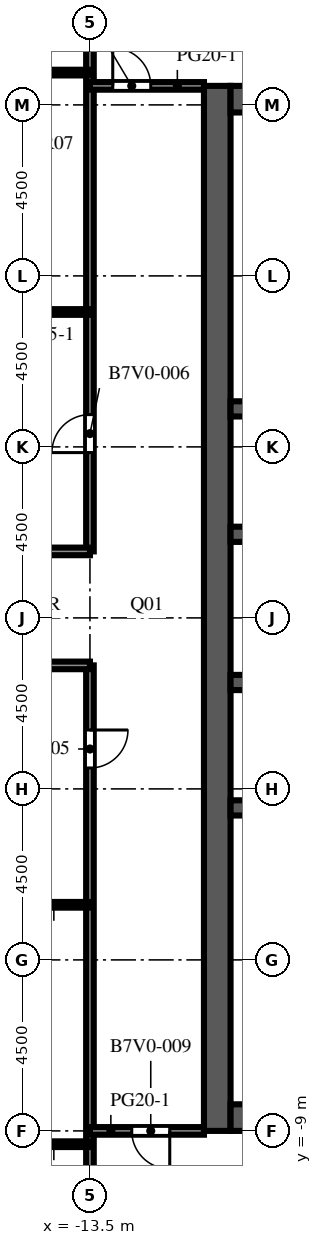
"""IFC4 building model, lengths in metres.
Left out: names, types, materials, properties, quantities, classifications, styles, units other than length and angle.
Written with IfcOpenShell. Run it as: python <this file> out.ifc"""

import sys

from ifc_helpers import new_model, si_unit, direction, frame, frame_2d, origin, place, context, subcontext, project, spatial, rectangle, extrude, element, fill, save


model = new_model("IFC4")
c1 = context("Model", 3, precision=1e-05, world=origin(), true_north=direction((0.0, 1.0)))
c2 = subcontext(c1, "Body", "Model", "MODEL_VIEW")
j1 = project(units=[si_unit("LENGTHUNIT", "METRE"), si_unit("PLANEANGLEUNIT", "RADIAN")], contexts=[c1])
p1 = place(None, origin())
s1 = spatial("IfcSite", under=j1, at=p1, CompositionType="ELEMENT")
p2 = place(p1, origin())
s2 = spatial("IfcBuilding", under=s1, at=p2, CompositionType="ELEMENT")
p3 = place(p2, frame((0.0, 0.0, 239.8)))
s3 = spatial("IfcBuildingStorey", under=s2, at=p3, CompositionType="ELEMENT", Elevation=239.8)
p4 = place(p3, frame((-10.15, -9.0, 0.0), z_axis=(0.0, 0.0, 1.0), x_axis=(0.0, 1.0, 0.0)))
e1 = element("IfcWall", 1, at=p4, inside=s3, PredefinedType="SHEAR", context=c2, shape_type="SweptSolid", body=[
    extrude(rectangle(XDim=27.5, YDim=0.7, at=frame_2d((13.75, 0.0))), origin(), (0.0, 0.0, 1.0), 4.1),
])
p5 = place(p4, frame((12.55, 0.0, 0.0)))
e2 = element("IfcOpeningElement", 2, at=p5, cuts=e1, PredefinedType="OPENING", context=c2, shape_type="SweptSolid", body=[
    extrude(rectangle(XDim=2.4, YDim=2.4, at=frame_2d((1.2, 1.2))), frame((0.0, 0.36, 0.0), z_axis=(0.0, -1.0, 0.0), x_axis=(1.0, 0.0, 0.0)), (0.0, 0.0, 1.0), 0.72),
])
p6 = place(p4, frame((6.825, 0.0, 0.0)))
e3 = element("IfcOpeningElement", 3, at=p6, cuts=e1, PredefinedType="OPENING", context=c2, shape_type="SweptSolid", body=[
    extrude(rectangle(XDim=1.2, YDim=2.1, at=frame_2d((0.6, 1.05))), frame((0.0, 0.36, 0.0), z_axis=(0.0, -1.0, 0.0), x_axis=(1.0, 0.0, 0.0)), (0.0, 0.0, 1.0), 0.72),
])
p7 = place(p4, frame((19.475, 0.0, 0.0)))
e4 = element("IfcOpeningElement", 4, at=p7, cuts=e1, PredefinedType="OPENING", context=c2, shape_type="SweptSolid", body=[
    extrude(rectangle(XDim=1.2, YDim=2.1, at=frame_2d((0.6, 1.05))), frame((0.0, 0.36, 0.0), z_axis=(0.0, -1.0, 0.0), x_axis=(1.0, 0.0, 0.0)), (0.0, 0.0, 1.0), 0.72),
])
for number, where, z_axis, x_axis in (
    (5, (-9.8, -8.65, 0.0), (0.0, 0.0, 1.0), (1.0, 0.0, 0.0)),
    (6, (-9.8, 18.15, 0.0), (0.0, 0.0, 1.0), (1.0, 0.0, 0.0)),
):
    element("IfcWall", number, at=place(p3, frame(where, z_axis=z_axis, x_axis=x_axis)), inside=s3, PredefinedType="SHEAR", context=c2, shape_type="SweptSolid", body=[
        extrude(rectangle(XDim=10.6, YDim=0.7, at=frame_2d((5.3, 0.0))), origin(), (0.0, 0.0, 1.0), 4.1),
    ])
p8 = place(p3, frame((-9.8, -0.5, 0.0), z_axis=(0.0, 0.0, 1.0), x_axis=(1.0, 0.0, 0.0)))
e7 = element("IfcWall", 7, at=p8, inside=s3, PredefinedType="SHEAR", context=c2, shape_type="SweptSolid", body=[
    extrude(rectangle(XDim=10.6, YDim=0.4, at=frame_2d((5.3, 0.0))), origin(), (0.0, 0.0, 1.0), 4.1),
])
p9 = place(p3, frame((-9.8, 2.8, 0.0), z_axis=(0.0, 0.0, 1.0), x_axis=(1.0, 0.0, 0.0)))
e8 = element("IfcWall", 8, at=p9, inside=s3, PredefinedType="SHEAR", context=c2, shape_type="SweptSolid", body=[
    extrude(rectangle(XDim=10.6, YDim=0.4, at=frame_2d((5.3, 0.0))), origin(), (0.0, 0.0, 1.0), 4.1),
])
p10 = place(p9, frame((0.688, 0.0, 0.0)))
e9 = element("IfcOpeningElement", 9, at=p10, cuts=e8, PredefinedType="OPENING", context=c2, shape_type="SweptSolid", body=[
    extrude(rectangle(XDim=1.1, YDim=2.1, at=frame_2d((0.55, 1.05))), frame((0.0, 0.21, 0.0), z_axis=(0.0, -1.0, 0.0), x_axis=(1.0, 0.0, 0.0)), (0.0, 0.0, 1.0), 0.42),
])
p11 = place(p9, frame((3.438, 0.0, 0.0)))
e10 = element("IfcOpeningElement", 10, at=p11, cuts=e8, PredefinedType="OPENING", context=c2, shape_type="SweptSolid", body=[
    extrude(rectangle(XDim=1.1, YDim=2.1, at=frame_2d((0.55, 1.05))), frame((0.0, 0.21, 0.0), z_axis=(0.0, -1.0, 0.0), x_axis=(1.0, 0.0, 0.0)), (0.0, 0.0, 1.0), 0.42),
])
p12 = place(p9, frame((6.113, 0.0, 0.0)))
e11 = element("IfcOpeningElement", 11, at=p12, cuts=e8, PredefinedType="OPENING", context=c2, shape_type="SweptSolid", body=[
    extrude(rectangle(XDim=1.0, YDim=2.1, at=frame_2d((0.5, 1.05))), frame((0.0, 0.21, 0.0), z_axis=(0.0, -1.0, 0.0), x_axis=(1.0, 0.0, 0.0)), (0.0, 0.0, 1.0), 0.42),
])
p13 = place(p9, frame((8.863, 0.0, 0.0)))
e12 = element("IfcOpeningElement", 12, at=p13, cuts=e8, PredefinedType="OPENING", context=c2, shape_type="SweptSolid", body=[
    extrude(rectangle(XDim=1.0, YDim=2.1, at=frame_2d((0.5, 1.05))), frame((0.0, 0.21, 0.0), z_axis=(0.0, -1.0, 0.0), x_axis=(1.0, 0.0, 0.0)), (0.0, 0.0, 1.0), 0.42),
])
p14 = place(p3, frame((-9.8, 6.7, 0.0), z_axis=(0.0, 0.0, 1.0), x_axis=(1.0, 0.0, 0.0)))
e13 = element("IfcWall", 13, at=p14, inside=s3, PredefinedType="SHEAR", context=c2, shape_type="SweptSolid", body=[
    extrude(rectangle(XDim=10.6, YDim=0.4, at=frame_2d((5.3, 0.0))), origin(), (0.0, 0.0, 1.0), 4.1),
])
p15 = place(p14, frame((3.438, 0.0, 0.0)))
e14 = element("IfcOpeningElement", 14, at=p15, cuts=e13, PredefinedType="OPENING", context=c2, shape_type="SweptSolid", body=[
    extrude(rectangle(XDim=1.1, YDim=2.1, at=frame_2d((0.55, 1.05))), frame((0.0, 0.21, 0.0), z_axis=(0.0, -1.0, 0.0), x_axis=(1.0, 0.0, 0.0)), (0.0, 0.0, 1.0), 0.42),
])
p16 = place(p14, frame((6.062, 0.0, 0.0)))
e15 = element("IfcOpeningElement", 15, at=p16, cuts=e13, PredefinedType="OPENING", context=c2, shape_type="SweptSolid", body=[
    extrude(rectangle(XDim=1.1, YDim=2.1, at=frame_2d((0.55, 1.05))), frame((0.0, 0.21, 0.0), z_axis=(0.0, -1.0, 0.0), x_axis=(1.0, 0.0, 0.0)), (0.0, 0.0, 1.0), 0.42),
])
p17 = place(p14, frame((8.812, 0.0, 0.0)))
e16 = element("IfcOpeningElement", 16, at=p17, cuts=e13, PredefinedType="OPENING", context=c2, shape_type="SweptSolid", body=[
    extrude(rectangle(XDim=1.1, YDim=2.1, at=frame_2d((0.55, 1.05))), frame((0.0, 0.21, 0.0), z_axis=(0.0, -1.0, 0.0), x_axis=(1.0, 0.0, 0.0)), (0.0, 0.0, 1.0), 0.42),
])
p18 = place(p14, frame((0.738, 0.0, 0.0)))
e17 = element("IfcOpeningElement", 17, at=p18, cuts=e13, PredefinedType="OPENING", context=c2, shape_type="SweptSolid", body=[
    extrude(rectangle(XDim=1.0, YDim=2.1, at=frame_2d((0.5, 1.05))), frame((0.0, 0.21, 0.0), z_axis=(0.0, -1.0, 0.0), x_axis=(1.0, 0.0, 0.0)), (0.0, 0.0, 1.0), 0.42),
])
p19 = place(p3, frame((-9.8, 10.0, 0.0), z_axis=(0.0, 0.0, 1.0), x_axis=(1.0, 0.0, 0.0)))
e18 = element("IfcWall", 18, at=p19, inside=s3, PredefinedType="SHEAR", context=c2, shape_type="SweptSolid", body=[
    extrude(rectangle(XDim=10.6, YDim=0.4, at=frame_2d((5.3, 0.0))), origin(), (0.0, 0.0, 1.0), 4.1),
])
p20 = place(p3, frame((-13.5, -22.077, 0.0), z_axis=(0.0, 0.0, 1.0), x_axis=(0.0, 1.0, 0.0)))
e19 = element("IfcWall", 19, at=p20, inside=s3, PredefinedType="PARTITIONING", context=c2, shape_type="SweptSolid", body=[
    extrude(rectangle(XDim=25.327, YDim=0.2, at=frame_2d((12.664, 0.0))), origin(), (0.0, 0.0, 1.0), 3.65),
])
p21 = place(p20, frame((22.627, 0.0, 0.0)))
e20 = element("IfcOpeningElement", 20, at=p21, cuts=e19, PredefinedType="OPENING", context=c2, shape_type="SweptSolid", body=[
    extrude(rectangle(XDim=1.0, YDim=2.1, at=frame_2d((0.5, 1.05))), frame((0.0, 0.11, 0.0), z_axis=(0.0, -1.0, 0.0), x_axis=(1.0, 0.0, 0.0)), (0.0, 0.0, 1.0), 0.22),
])
p22 = place(p3, frame((-13.5, 6.25, 0.0), z_axis=(0.0, 0.0, 1.0), x_axis=(0.0, 1.0, 0.0)))
e21 = element("IfcWall", 21, at=p22, inside=s3, PredefinedType="PARTITIONING", context=c2, shape_type="SweptSolid", body=[
    extrude(rectangle(XDim=24.827, YDim=0.2, at=frame_2d((12.414, 0.0))), origin(), (0.0, 0.0, 1.0), 3.65),
])
p23 = place(p22, frame((2.6, 0.0, 0.0)))
e22 = element("IfcOpeningElement", 22, at=p23, cuts=e21, PredefinedType="OPENING", context=c2, shape_type="SweptSolid", body=[
    extrude(rectangle(XDim=1.0, YDim=2.1, at=frame_2d((0.5, 1.05))), frame((0.0, 0.11, 0.0), z_axis=(0.0, -1.0, 0.0), x_axis=(1.0, 0.0, 0.0)), (0.0, 0.0, 1.0), 0.22),
])
p24 = place(p3, frame((-13.5, -9.35, 0.0), z_axis=(0.0, 0.0, 1.0), x_axis=(-1.0, 0.0, 0.0)))
e23 = element("IfcWall", 23, at=p24, inside=s3, PredefinedType="PARTITIONING", context=c2, shape_type="SweptSolid", body=[
    extrude(rectangle(XDim=4.1, YDim=0.15, at=frame_2d((2.05, 0.0))), origin(), (0.0, 0.0, 1.0), 3.65),
])
p25 = place(p24, frame((1.9, 0.0, 0.0)))
e24 = element("IfcOpeningElement", 24, at=p25, cuts=e23, PredefinedType="OPENING", context=c2, shape_type="SweptSolid", body=[
    extrude(rectangle(XDim=1.0, YDim=2.1, at=frame_2d((0.5, 1.05))), frame((0.0, 0.085, 0.0), z_axis=(0.0, -1.0, 0.0), x_axis=(1.0, 0.0, 0.0)), (0.0, 0.0, 1.0), 0.17),
])
p26 = place(p3, frame((-10.5, -9.0, 0.0), z_axis=(0.0, 0.0, 1.0), x_axis=(-1.0, 0.0, 0.0)))
e25 = element("IfcWall", 25, at=p26, inside=s3, PredefinedType="PARTITIONING", context=c2, shape_type="SweptSolid", body=[
    extrude(rectangle(XDim=3.0, YDim=0.2, at=frame_2d((1.5, 0.0))), origin(), (0.0, 0.0, 1.0), 3.65),
])
p27 = place(p26, frame((0.9, 0.0, 0.0)))
e26 = element("IfcOpeningElement", 26, at=p27, cuts=e25, PredefinedType="OPENING", context=c2, shape_type="SweptSolid", body=[
    extrude(rectangle(XDim=1.0, YDim=2.1, at=frame_2d((0.5, 1.05))), frame((0.0, 0.11, 0.0), z_axis=(0.0, -1.0, 0.0), x_axis=(1.0, 0.0, 0.0)), (0.0, 0.0, 1.0), 0.22),
])
p28 = place(p3, frame((-13.5, -3.05, 0.0), z_axis=(0.0, 0.0, 1.0), x_axis=(-1.0, 0.0, 0.0)))
e27 = element("IfcWall", 27, at=p28, inside=s3, PredefinedType="PARTITIONING", context=c2, shape_type="SweptSolid", body=[
    extrude(rectangle(XDim=4.35, YDim=0.15, at=frame_2d((2.175, 0.0))), origin(), (0.0, 0.0, 1.0), 3.65),
])
p29 = place(p28, frame((1.9, 0.0, 0.0)))
e28 = element("IfcOpeningElement", 28, at=p29, cuts=e27, PredefinedType="OPENING", context=c2, shape_type="SweptSolid", body=[
    extrude(rectangle(XDim=1.0, YDim=2.1, at=frame_2d((0.5, 1.05))), frame((0.0, 0.085, 0.0), z_axis=(0.0, -1.0, 0.0), x_axis=(1.0, 0.0, 0.0)), (0.0, 0.0, 1.0), 0.17),
])
for number, where, z_axis, x_axis in (
    (29, (-17.85, 3.25, 0.0), (0.0, 0.0, 1.0), (1.0, 0.0, 0.0)),
    (30, (-17.85, 6.25, 0.0), (0.0, 0.0, 1.0), (1.0, 0.0, 0.0)),
):
    element("IfcWall", number, at=place(p3, frame(where, z_axis=z_axis, x_axis=x_axis)), inside=s3, PredefinedType="PARTITIONING", context=c2, shape_type="SweptSolid", body=[
        extrude(rectangle(XDim=4.35, YDim=0.2, at=frame_2d((2.175, 0.0))), origin(), (0.0, 0.0, 1.0), 3.65),
    ])
p30 = place(p3, frame((-17.85, 12.55, 0.0), z_axis=(0.0, 0.0, 1.0), x_axis=(1.0, 0.0, 0.0)))
e31 = element("IfcWall", 31, at=p30, inside=s3, PredefinedType="PARTITIONING", context=c2, shape_type="SweptSolid", body=[
    extrude(rectangle(XDim=4.35, YDim=0.15, at=frame_2d((2.175, 0.0))), origin(), (0.0, 0.0, 1.0), 3.65),
])
p31 = place(p30, frame((0.95, 0.0, 0.0)))
e32 = element("IfcOpeningElement", 32, at=p31, cuts=e31, PredefinedType="OPENING", context=c2, shape_type="SweptSolid", body=[
    extrude(rectangle(XDim=1.0, YDim=2.1, at=frame_2d((0.5, 1.05))), frame((0.0, 0.085, 0.0), z_axis=(0.0, -1.0, 0.0), x_axis=(1.0, 0.0, 0.0)), (0.0, 0.0, 1.0), 0.17),
])
p32 = place(p3, frame((-13.5, 18.5, 0.0), z_axis=(0.0, 0.0, 1.0), x_axis=(1.0, 0.0, 0.0)))
e33 = element("IfcWall", 33, at=p32, inside=s3, PredefinedType="PARTITIONING", context=c2, shape_type="SweptSolid", body=[
    extrude(rectangle(XDim=3.0, YDim=0.2, at=frame_2d((1.5, 0.0))), origin(), (0.0, 0.0, 1.0), 3.65),
])
p33 = place(p32, frame((0.6, 0.0, 0.0)))
e34 = element("IfcOpeningElement", 34, at=p33, cuts=e33, PredefinedType="OPENING", context=c2, shape_type="SweptSolid", body=[
    extrude(rectangle(XDim=1.0, YDim=2.1, at=frame_2d((0.5, 1.05))), frame((0.0, 0.11, 0.0), z_axis=(0.0, -1.0, 0.0), x_axis=(1.0, 0.0, 0.0)), (0.0, 0.0, 1.0), 0.22),
])
p34 = place(p3, frame((-17.85, 18.85, 0.0), z_axis=(0.0, 0.0, 1.0), x_axis=(1.0, 0.0, 0.0)))
e35 = element("IfcWall", 35, at=p34, inside=s3, PredefinedType="PARTITIONING", context=c2, shape_type="SweptSolid", body=[
    extrude(rectangle(XDim=4.35, YDim=0.15, at=frame_2d((2.175, 0.0))), origin(), (0.0, 0.0, 1.0), 3.65),
])
p35 = place(p34, frame((1.7, 0.0, 0.0)))
e36 = element("IfcOpeningElement", 36, at=p35, cuts=e35, PredefinedType="OPENING", context=c2, shape_type="SweptSolid", body=[
    extrude(rectangle(XDim=1.0, YDim=2.1, at=frame_2d((0.5, 1.05))), frame((0.0, 0.085, 0.0), z_axis=(0.0, -1.0, 0.0), x_axis=(1.0, 0.0, 0.0)), (0.0, 0.0, 1.0), 0.17),
])
p36 = place(p5, origin())
e37 = element("IfcDoor", 37, at=p36, inside=s3, OperationType="DOUBLE_DOOR_DOUBLE_SWING", PredefinedType="DOOR", context=c2, shape_type="SweptSolid", body=[
    extrude(rectangle(XDim=2.4, YDim=2.4, at=frame_2d((1.2, 1.2))), frame((0.0, 0.025, 0.0), z_axis=(0.0, -1.0, 0.0), x_axis=(1.0, 0.0, 0.0)), (0.0, 0.0, 1.0), 0.05),
])
fill(e2, e37)
p37 = place(p6, origin())
e38 = element("IfcDoor", 38, at=p37, inside=s3, OperationType="SINGLE_SWING_LEFT", PredefinedType="DOOR", context=c2, shape_type="SweptSolid", body=[
    extrude(rectangle(XDim=1.2, YDim=2.1, at=frame_2d((0.6, 1.05))), frame((0.0, 0.025, 0.0), z_axis=(0.0, -1.0, 0.0), x_axis=(1.0, 0.0, 0.0)), (0.0, 0.0, 1.0), 0.05),
])
fill(e3, e38)
p38 = place(p7, origin())
e39 = element("IfcDoor", 39, at=p38, inside=s3, OperationType="SINGLE_SWING_LEFT", PredefinedType="DOOR", context=c2, shape_type="SweptSolid", body=[
    extrude(rectangle(XDim=1.2, YDim=2.1, at=frame_2d((0.6, 1.05))), frame((0.0, 0.025, 0.0), z_axis=(0.0, -1.0, 0.0), x_axis=(1.0, 0.0, 0.0)), (0.0, 0.0, 1.0), 0.05),
])
fill(e4, e39)
p39 = place(p21, origin())
e40 = element("IfcDoor", 40, at=p39, inside=s3, OperationType="SINGLE_SWING_RIGHT", PredefinedType="DOOR", context=c2, shape_type="SweptSolid", body=[
    extrude(rectangle(XDim=1.0, YDim=2.1, at=frame_2d((0.5, 1.05))), frame((0.0, 0.025, 0.0), z_axis=(0.0, -1.0, 0.0), x_axis=(1.0, 0.0, 0.0)), (0.0, 0.0, 1.0), 0.05),
])
fill(e20, e40)
p40 = place(p23, origin())
e41 = element("IfcDoor", 41, at=p40, inside=s3, OperationType="SINGLE_SWING_LEFT", PredefinedType="DOOR", context=c2, shape_type="SweptSolid", body=[
    extrude(rectangle(XDim=1.0, YDim=2.1, at=frame_2d((0.5, 1.05))), frame((0.0, 0.025, 0.0), z_axis=(0.0, -1.0, 0.0), x_axis=(1.0, 0.0, 0.0)), (0.0, 0.0, 1.0), 0.05),
])
fill(e22, e41)
p41 = place(p27, origin())
e42 = element("IfcDoor", 42, at=p41, inside=s3, OperationType="SINGLE_SWING_LEFT", PredefinedType="DOOR", context=c2, shape_type="SweptSolid", body=[
    extrude(rectangle(XDim=1.0, YDim=2.1, at=frame_2d((0.5, 1.05))), frame((0.0, 0.025, 0.0), z_axis=(0.0, -1.0, 0.0), x_axis=(1.0, 0.0, 0.0)), (0.0, 0.0, 1.0), 0.05),
])
fill(e26, e42)
p42 = place(p33, origin())
e43 = element("IfcDoor", 43, at=p42, inside=s3, OperationType="SINGLE_SWING_LEFT", PredefinedType="DOOR", context=c2, shape_type="SweptSolid", body=[
    extrude(rectangle(XDim=1.0, YDim=2.1, at=frame_2d((0.5, 1.05))), frame((0.0, 0.025, 0.0), z_axis=(0.0, -1.0, 0.0), x_axis=(1.0, 0.0, 0.0)), (0.0, 0.0, 1.0), 0.05),
])
fill(e34, e43)
save(model, sys.argv[1])
